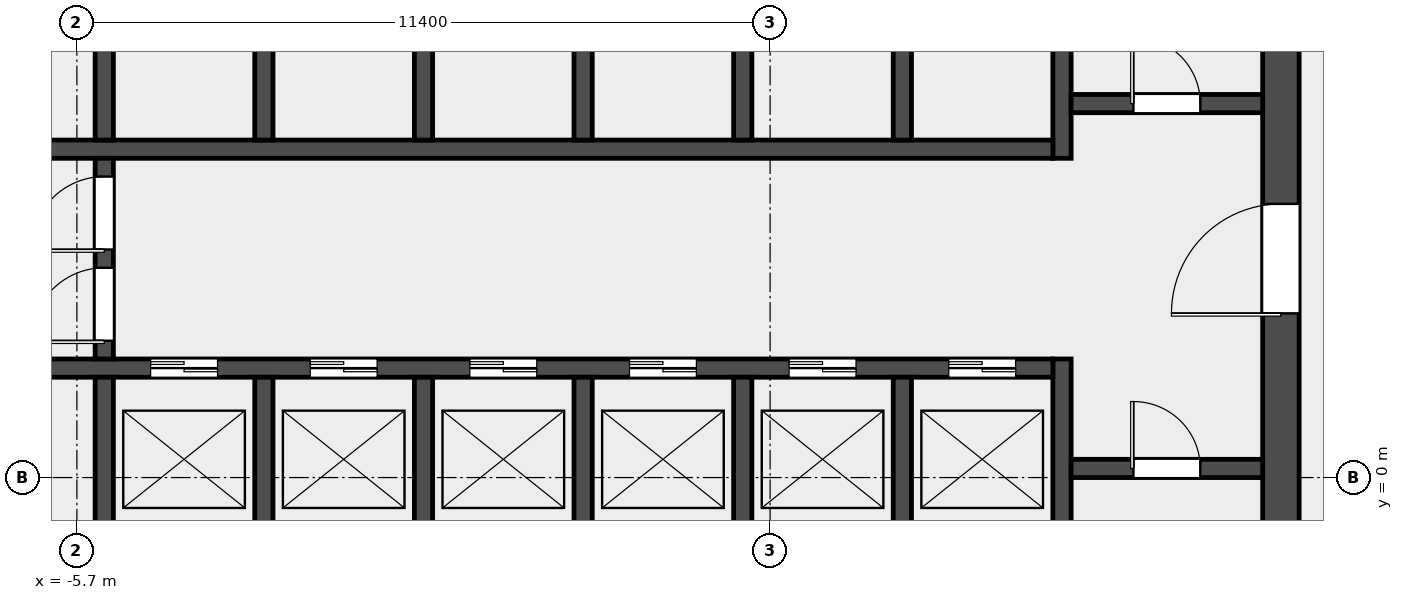
"""IFC4 building model, lengths in metres.
Left out: names, types, materials, properties, quantities, classifications, styles, units other than length and angle.
Written with IfcOpenShell. Run it as: python <this file> out.ifc"""

import sys

from ifc_helpers import new_model, si_unit, direction, frame, frame_2d, origin, place, context, subcontext, project, spatial, rectangle, extrude, element, fill, save


model = new_model("IFC4")
c1 = context("Model", 3, precision=1e-05, world=origin(), true_north=direction((0.0, 1.0)))
c2 = subcontext(c1, "Body", "Model", "MODEL_VIEW")
j1 = project(units=[si_unit("LENGTHUNIT", "METRE"), si_unit("PLANEANGLEUNIT", "RADIAN")], contexts=[c1])
p1 = place(None, origin())
s1 = spatial("IfcSite", under=j1, at=p1, CompositionType="ELEMENT")
p2 = place(p1, origin())
s2 = spatial("IfcBuilding", under=s1, at=p2, CompositionType="ELEMENT")
p3 = place(p2, frame((0.0, 0.0, 14.5)))
s3 = spatial("IfcBuildingStorey", under=s2, at=p3, CompositionType="ELEMENT", Elevation=14.5)
p4 = place(p3, frame((14.1, -6.6, 0.0), z_axis=(0.0, 0.0, 1.0), x_axis=(0.0, 1.0, 0.0)))
e1 = element("IfcWall", 1, at=p4, inside=s3, PredefinedType="SHEAR", context=c2, shape_type="SweptSolid", body=[
    extrude(rectangle(XDim=19.5, YDim=0.6, at=frame_2d((9.75, 0.0))), origin(), (0.0, 0.0, 1.0), 5.2),
])
p5 = place(p4, frame((9.3, 0.0, 0.0)))
e2 = element("IfcOpeningElement", 2, at=p5, cuts=e1, PredefinedType="OPENING", context=c2, shape_type="SweptSolid", body=[
    extrude(rectangle(XDim=1.8, YDim=2.1, at=frame_2d((0.9, 1.05))), frame((0.0, 0.312, 0.0), z_axis=(0.0, -1.0, 0.0), x_axis=(1.0, 0.0, 0.0)), (0.0, 0.0, 1.0), 0.624),
])
p6 = place(p3, frame((10.5, -6.6, 0.0), z_axis=(0.0, 0.0, 1.0), x_axis=(0.0, 1.0, 0.0)))
e3 = element("IfcWall", 3, at=p6, inside=s3, PredefinedType="SHEAR", context=c2, shape_type="SweptSolid", body=[
    extrude(rectangle(XDim=8.55, YDim=0.3, at=frame_2d((4.275, 0.0))), origin(), (0.0, 0.0, 1.0), 5.2),
])
p7 = place(p3, frame((10.5, 5.25, 0.0), z_axis=(0.0, 0.0, 1.0), x_axis=(0.0, 1.0, 0.0)))
e4 = element("IfcWall", 4, at=p7, inside=s3, PredefinedType="SHEAR", context=c2, shape_type="SweptSolid", body=[
    extrude(rectangle(XDim=7.65, YDim=0.3, at=frame_2d((3.825, 0.0))), origin(), (0.0, 0.0, 1.0), 5.2),
])
p8 = place(p3, frame((10.65, 0.15, 0.0), z_axis=(0.0, 0.0, 1.0), x_axis=(1.0, 0.0, 0.0)))
e5 = element("IfcWall", 5, at=p8, inside=s3, PredefinedType="SOLIDWALL", context=c2, shape_type="SweptSolid", body=[
    extrude(rectangle(XDim=3.15, YDim=0.3, at=frame_2d((1.575, 0.0))), origin(), (0.0, 0.0, 1.0), 5.2),
])
p9 = place(p8, frame((1.025, 0.0, 0.0)))
e6 = element("IfcOpeningElement", 6, at=p9, cuts=e5, PredefinedType="OPENING", context=c2, shape_type="SweptSolid", body=[
    extrude(rectangle(XDim=1.1, YDim=2.1, at=frame_2d((0.55, 1.05))), frame((0.0, 0.162, 0.0), z_axis=(0.0, -1.0, 0.0), x_axis=(1.0, 0.0, 0.0)), (0.0, 0.0, 1.0), 0.324),
])
p10 = place(p3, frame((10.65, 6.15, 0.0), z_axis=(0.0, 0.0, 1.0), x_axis=(1.0, 0.0, 0.0)))
e7 = element("IfcWall", 7, at=p10, inside=s3, PredefinedType="SOLIDWALL", context=c2, shape_type="SweptSolid", body=[
    extrude(rectangle(XDim=3.15, YDim=0.3, at=frame_2d((1.575, 0.0))), origin(), (0.0, 0.0, 1.0), 5.2),
])
p11 = place(p10, frame((1.025, 0.0, 0.0)))
e8 = element("IfcOpeningElement", 8, at=p11, cuts=e7, PredefinedType="OPENING", context=c2, shape_type="SweptSolid", body=[
    extrude(rectangle(XDim=1.1, YDim=2.1, at=frame_2d((0.55, 1.05))), frame((0.0, 0.162, 0.0), z_axis=(0.0, -1.0, 0.0), x_axis=(1.0, 0.0, 0.0)), (0.0, 0.0, 1.0), 0.324),
])
p12 = place(p3, frame((-10.35, 1.8, 0.0), z_axis=(0.0, 0.0, 1.0), x_axis=(1.0, 0.0, 0.0)))
e9 = element("IfcWall", 9, at=p12, inside=s3, PredefinedType="SOLIDWALL", context=c2, shape_type="SweptSolid", body=[
    extrude(rectangle(XDim=20.7, YDim=0.3, at=frame_2d((10.35, 0.0))), origin(), (0.0, 0.0, 1.0), 5.2),
])
p13 = place(p12, frame((0.512, 0.0, 0.0)))
e10 = element("IfcOpeningElement", 10, at=p13, cuts=e9, PredefinedType="OPENING", context=c2, shape_type="SweptSolid", body=[
    extrude(rectangle(XDim=1.3, YDim=2.1, at=frame_2d((0.65, 1.05))), frame((0.0, 0.162, 0.0), z_axis=(0.0, -1.0, 0.0), x_axis=(1.0, 0.0, 0.0)), (0.0, 0.0, 1.0), 0.324),
])
p14 = place(p12, frame((5.863, 0.0, 0.0)))
e11 = element("IfcOpeningElement", 11, at=p14, cuts=e9, PredefinedType="OPENING", context=c2, shape_type="SweptSolid", body=[
    extrude(rectangle(XDim=1.1, YDim=2.1, at=frame_2d((0.55, 1.05))), frame((0.0, 0.162, 0.0), z_axis=(0.0, -1.0, 0.0), x_axis=(1.0, 0.0, 0.0)), (0.0, 0.0, 1.0), 0.324),
])
p15 = place(p12, frame((8.488, 0.0, 0.0)))
e12 = element("IfcOpeningElement", 12, at=p15, cuts=e9, PredefinedType="OPENING", context=c2, shape_type="SweptSolid", body=[
    extrude(rectangle(XDim=1.1, YDim=2.1, at=frame_2d((0.55, 1.05))), frame((0.0, 0.162, 0.0), z_axis=(0.0, -1.0, 0.0), x_axis=(1.0, 0.0, 0.0)), (0.0, 0.0, 1.0), 0.324),
])
p16 = place(p12, frame((11.113, 0.0, 0.0)))
e13 = element("IfcOpeningElement", 13, at=p16, cuts=e9, PredefinedType="OPENING", context=c2, shape_type="SweptSolid", body=[
    extrude(rectangle(XDim=1.1, YDim=2.1, at=frame_2d((0.55, 1.05))), frame((0.0, 0.162, 0.0), z_axis=(0.0, -1.0, 0.0), x_axis=(1.0, 0.0, 0.0)), (0.0, 0.0, 1.0), 0.324),
])
p17 = place(p12, frame((13.738, 0.0, 0.0)))
e14 = element("IfcOpeningElement", 14, at=p17, cuts=e9, PredefinedType="OPENING", context=c2, shape_type="SweptSolid", body=[
    extrude(rectangle(XDim=1.1, YDim=2.1, at=frame_2d((0.55, 1.05))), frame((0.0, 0.162, 0.0), z_axis=(0.0, -1.0, 0.0), x_axis=(1.0, 0.0, 0.0)), (0.0, 0.0, 1.0), 0.324),
])
p18 = place(p12, frame((16.363, 0.0, 0.0)))
e15 = element("IfcOpeningElement", 15, at=p18, cuts=e9, PredefinedType="OPENING", context=c2, shape_type="SweptSolid", body=[
    extrude(rectangle(XDim=1.1, YDim=2.1, at=frame_2d((0.55, 1.05))), frame((0.0, 0.162, 0.0), z_axis=(0.0, -1.0, 0.0), x_axis=(1.0, 0.0, 0.0)), (0.0, 0.0, 1.0), 0.324),
])
p19 = place(p12, frame((18.988, 0.0, 0.0)))
e16 = element("IfcOpeningElement", 16, at=p19, cuts=e9, PredefinedType="OPENING", context=c2, shape_type="SweptSolid", body=[
    extrude(rectangle(XDim=1.1, YDim=2.1, at=frame_2d((0.55, 1.05))), frame((0.0, 0.162, 0.0), z_axis=(0.0, -1.0, 0.0), x_axis=(1.0, 0.0, 0.0)), (0.0, 0.0, 1.0), 0.324),
])
p20 = place(p3, frame((-10.35, 5.4, 0.0), z_axis=(0.0, 0.0, 1.0), x_axis=(1.0, 0.0, 0.0)))
e17 = element("IfcWall", 17, at=p20, inside=s3, PredefinedType="SOLIDWALL", context=c2, shape_type="SweptSolid", body=[
    extrude(rectangle(XDim=20.7, YDim=0.3, at=frame_2d((10.35, 0.0))), origin(), (0.0, 0.0, 1.0), 5.2),
])
p21 = place(p20, frame((0.512, 0.0, 0.0)))
e18 = element("IfcOpeningElement", 18, at=p21, cuts=e17, PredefinedType="OPENING", context=c2, shape_type="SweptSolid", body=[
    extrude(rectangle(XDim=1.3, YDim=2.1, at=frame_2d((0.65, 1.05))), frame((0.0, 0.162, 0.0), z_axis=(0.0, -1.0, 0.0), x_axis=(1.0, 0.0, 0.0)), (0.0, 0.0, 1.0), 0.324),
])
for number, where, z_axis, x_axis in (
    (19, (-5.25, -1.05, 0.0), (0.0, 0.0, 1.0), (0.0, 1.0, 0.0)),
    (20, (-2.625, -1.05, 0.0), (0.0, 0.0, 1.0), (0.0, 1.0, 0.0)),
    (21, (0.0, -1.05, 0.0), (0.0, 0.0, 1.0), (0.0, 1.0, 0.0)),
    (22, (2.625, -1.05, 0.0), (0.0, 0.0, 1.0), (0.0, 1.0, 0.0)),
    (23, (5.25, -1.05, 0.0), (0.0, 0.0, 1.0), (0.0, 1.0, 0.0)),
    (24, (7.875, -1.05, 0.0), (0.0, 0.0, 1.0), (0.0, 1.0, 0.0)),
    (25, (-5.25, 5.55, 0.0), (0.0, 0.0, 1.0), (0.0, 1.0, 0.0)),
    (26, (-2.625, 5.55, 0.0), (0.0, 0.0, 1.0), (0.0, 1.0, 0.0)),
    (27, (0.0, 5.55, 0.0), (0.0, 0.0, 1.0), (0.0, 1.0, 0.0)),
    (28, (2.625, 5.55, 0.0), (0.0, 0.0, 1.0), (0.0, 1.0, 0.0)),
    (29, (5.25, 5.55, 0.0), (0.0, 0.0, 1.0), (0.0, 1.0, 0.0)),
    (30, (7.875, 5.55, 0.0), (0.0, 0.0, 1.0), (0.0, 1.0, 0.0)),
):
    element("IfcWall", number, at=place(p3, frame(where, z_axis=z_axis, x_axis=x_axis)), inside=s3, PredefinedType="SOLIDWALL", context=c2, shape_type="SweptSolid", body=[
        extrude(rectangle(XDim=2.7, YDim=0.3, at=frame_2d((1.35, 0.0))), origin(), (0.0, 0.0, 1.0), 5.2),
    ])
p22 = place(p3, frame((-5.25, 1.95, 0.0), z_axis=(0.0, 0.0, 1.0), x_axis=(0.0, 1.0, 0.0)))
e31 = element("IfcWall", 31, at=p22, inside=s3, PredefinedType="SOLIDWALL", context=c2, shape_type="SweptSolid", body=[
    extrude(rectangle(XDim=3.3, YDim=0.3, at=frame_2d((1.65, 0.0))), origin(), (0.0, 0.0, 1.0), 5.2),
])
p23 = place(p22, frame((0.3, 0.0, 0.0)))
e32 = element("IfcOpeningElement", 32, at=p23, cuts=e31, PredefinedType="OPENING", context=c2, shape_type="SweptSolid", body=[
    extrude(rectangle(XDim=1.2, YDim=2.1, at=frame_2d((0.6, 1.05))), frame((0.0, 0.162, 0.0), z_axis=(0.0, -1.0, 0.0), x_axis=(1.0, 0.0, 0.0)), (0.0, 0.0, 1.0), 0.324),
])
p24 = place(p22, frame((1.8, 0.0, 0.0)))
e33 = element("IfcOpeningElement", 33, at=p24, cuts=e31, PredefinedType="OPENING", context=c2, shape_type="SweptSolid", body=[
    extrude(rectangle(XDim=1.2, YDim=2.1, at=frame_2d((0.6, 1.05))), frame((0.0, 0.162, 0.0), z_axis=(0.0, -1.0, 0.0), x_axis=(1.0, 0.0, 0.0)), (0.0, 0.0, 1.0), 0.324),
])
p25 = place(p9, origin())
e34 = element("IfcDoor", 34, at=p25, inside=s3, OperationType="SINGLE_SWING_RIGHT", PredefinedType="DOOR", context=c2, shape_type="SweptSolid", body=[
    extrude(rectangle(XDim=1.1, YDim=2.1, at=frame_2d((0.55, 1.05))), frame((0.0, 0.025, 0.0), z_axis=(0.0, -1.0, 0.0), x_axis=(1.0, 0.0, 0.0)), (0.0, 0.0, 1.0), 0.05),
])
fill(e6, e34)
p26 = place(p11, origin())
e35 = element("IfcDoor", 35, at=p26, inside=s3, OperationType="SINGLE_SWING_RIGHT", PredefinedType="DOOR", context=c2, shape_type="SweptSolid", body=[
    extrude(rectangle(XDim=1.1, YDim=2.1, at=frame_2d((0.55, 1.05))), frame((0.0, 0.025, 0.0), z_axis=(0.0, -1.0, 0.0), x_axis=(1.0, 0.0, 0.0)), (0.0, 0.0, 1.0), 0.05),
])
fill(e8, e35)
p27 = place(p5, origin())
e36 = element("IfcDoor", 36, at=p27, inside=s3, OperationType="DOUBLE_DOOR_SINGLE_SWING", PredefinedType="DOOR", context=c2, shape_type="SweptSolid", body=[
    extrude(rectangle(XDim=1.8, YDim=2.1, at=frame_2d((0.9, 1.05))), frame((0.0, 0.025, 0.0), z_axis=(0.0, -1.0, 0.0), x_axis=(1.0, 0.0, 0.0)), (0.0, 0.0, 1.0), 0.05),
])
fill(e2, e36)
p28 = place(p23, origin())
e37 = element("IfcDoor", 37, at=p28, inside=s3, OperationType="SINGLE_SWING_LEFT", PredefinedType="DOOR", context=c2, shape_type="SweptSolid", body=[
    extrude(rectangle(XDim=1.2, YDim=2.1, at=frame_2d((0.6, 1.05))), frame((0.0, 0.025, 0.0), z_axis=(0.0, -1.0, 0.0), x_axis=(1.0, 0.0, 0.0)), (0.0, 0.0, 1.0), 0.05),
])
fill(e32, e37)
p29 = place(p24, origin())
e38 = element("IfcDoor", 38, at=p29, inside=s3, OperationType="SINGLE_SWING_RIGHT", PredefinedType="DOOR", context=c2, shape_type="SweptSolid", body=[
    extrude(rectangle(XDim=1.2, YDim=2.1, at=frame_2d((0.6, 1.05))), frame((0.0, 0.025, 0.0), z_axis=(0.0, -1.0, 0.0), x_axis=(1.0, 0.0, 0.0)), (0.0, 0.0, 1.0), 0.05),
])
fill(e33, e38)
p30 = place(p14, origin())
e39 = element("IfcDoor", 39, at=p30, inside=s3, OperationType="DOUBLE_DOOR_SLIDING", PredefinedType="DOOR", context=c2, shape_type="SweptSolid", body=[
    extrude(rectangle(XDim=1.1, YDim=2.1, at=frame_2d((0.55, 1.05))), frame((0.0, 0.025, 0.0), z_axis=(0.0, -1.0, 0.0), x_axis=(1.0, 0.0, 0.0)), (0.0, 0.0, 1.0), 0.05),
])
fill(e11, e39)
p31 = place(p15, origin())
e40 = element("IfcDoor", 40, at=p31, inside=s3, OperationType="DOUBLE_DOOR_SLIDING", PredefinedType="DOOR", context=c2, shape_type="SweptSolid", body=[
    extrude(rectangle(XDim=1.1, YDim=2.1, at=frame_2d((0.55, 1.05))), frame((0.0, 0.025, 0.0), z_axis=(0.0, -1.0, 0.0), x_axis=(1.0, 0.0, 0.0)), (0.0, 0.0, 1.0), 0.05),
])
fill(e12, e40)
p32 = place(p16, origin())
e41 = element("IfcDoor", 41, at=p32, inside=s3, OperationType="DOUBLE_DOOR_SLIDING", PredefinedType="DOOR", context=c2, shape_type="SweptSolid", body=[
    extrude(rectangle(XDim=1.1, YDim=2.1, at=frame_2d((0.55, 1.05))), frame((0.0, 0.025, 0.0), z_axis=(0.0, -1.0, 0.0), x_axis=(1.0, 0.0, 0.0)), (0.0, 0.0, 1.0), 0.05),
])
fill(e13, e41)
p33 = place(p17, origin())
e42 = element("IfcDoor", 42, at=p33, inside=s3, OperationType="DOUBLE_DOOR_SLIDING", PredefinedType="DOOR", context=c2, shape_type="SweptSolid", body=[
    extrude(rectangle(XDim=1.1, YDim=2.1, at=frame_2d((0.55, 1.05))), frame((0.0, 0.025, 0.0), z_axis=(0.0, -1.0, 0.0), x_axis=(1.0, 0.0, 0.0)), (0.0, 0.0, 1.0), 0.05),
])
fill(e14, e42)
p34 = place(p18, origin())
e43 = element("IfcDoor", 43, at=p34, inside=s3, OperationType="DOUBLE_DOOR_SLIDING", PredefinedType="DOOR", context=c2, shape_type="SweptSolid", body=[
    extrude(rectangle(XDim=1.1, YDim=2.1, at=frame_2d((0.55, 1.05))), frame((0.0, 0.025, 0.0), z_axis=(0.0, -1.0, 0.0), x_axis=(1.0, 0.0, 0.0)), (0.0, 0.0, 1.0), 0.05),
])
fill(e15, e43)
p35 = place(p19, origin())
e44 = element("IfcDoor", 44, at=p35, inside=s3, OperationType="DOUBLE_DOOR_SLIDING", PredefinedType="DOOR", context=c2, shape_type="SweptSolid", body=[
    extrude(rectangle(XDim=1.1, YDim=2.1, at=frame_2d((0.55, 1.05))), frame((0.0, 0.025, 0.0), z_axis=(0.0, -1.0, 0.0), x_axis=(1.0, 0.0, 0.0)), (0.0, 0.0, 1.0), 0.05),
])
fill(e16, e44)
save(model, sys.argv[1])
